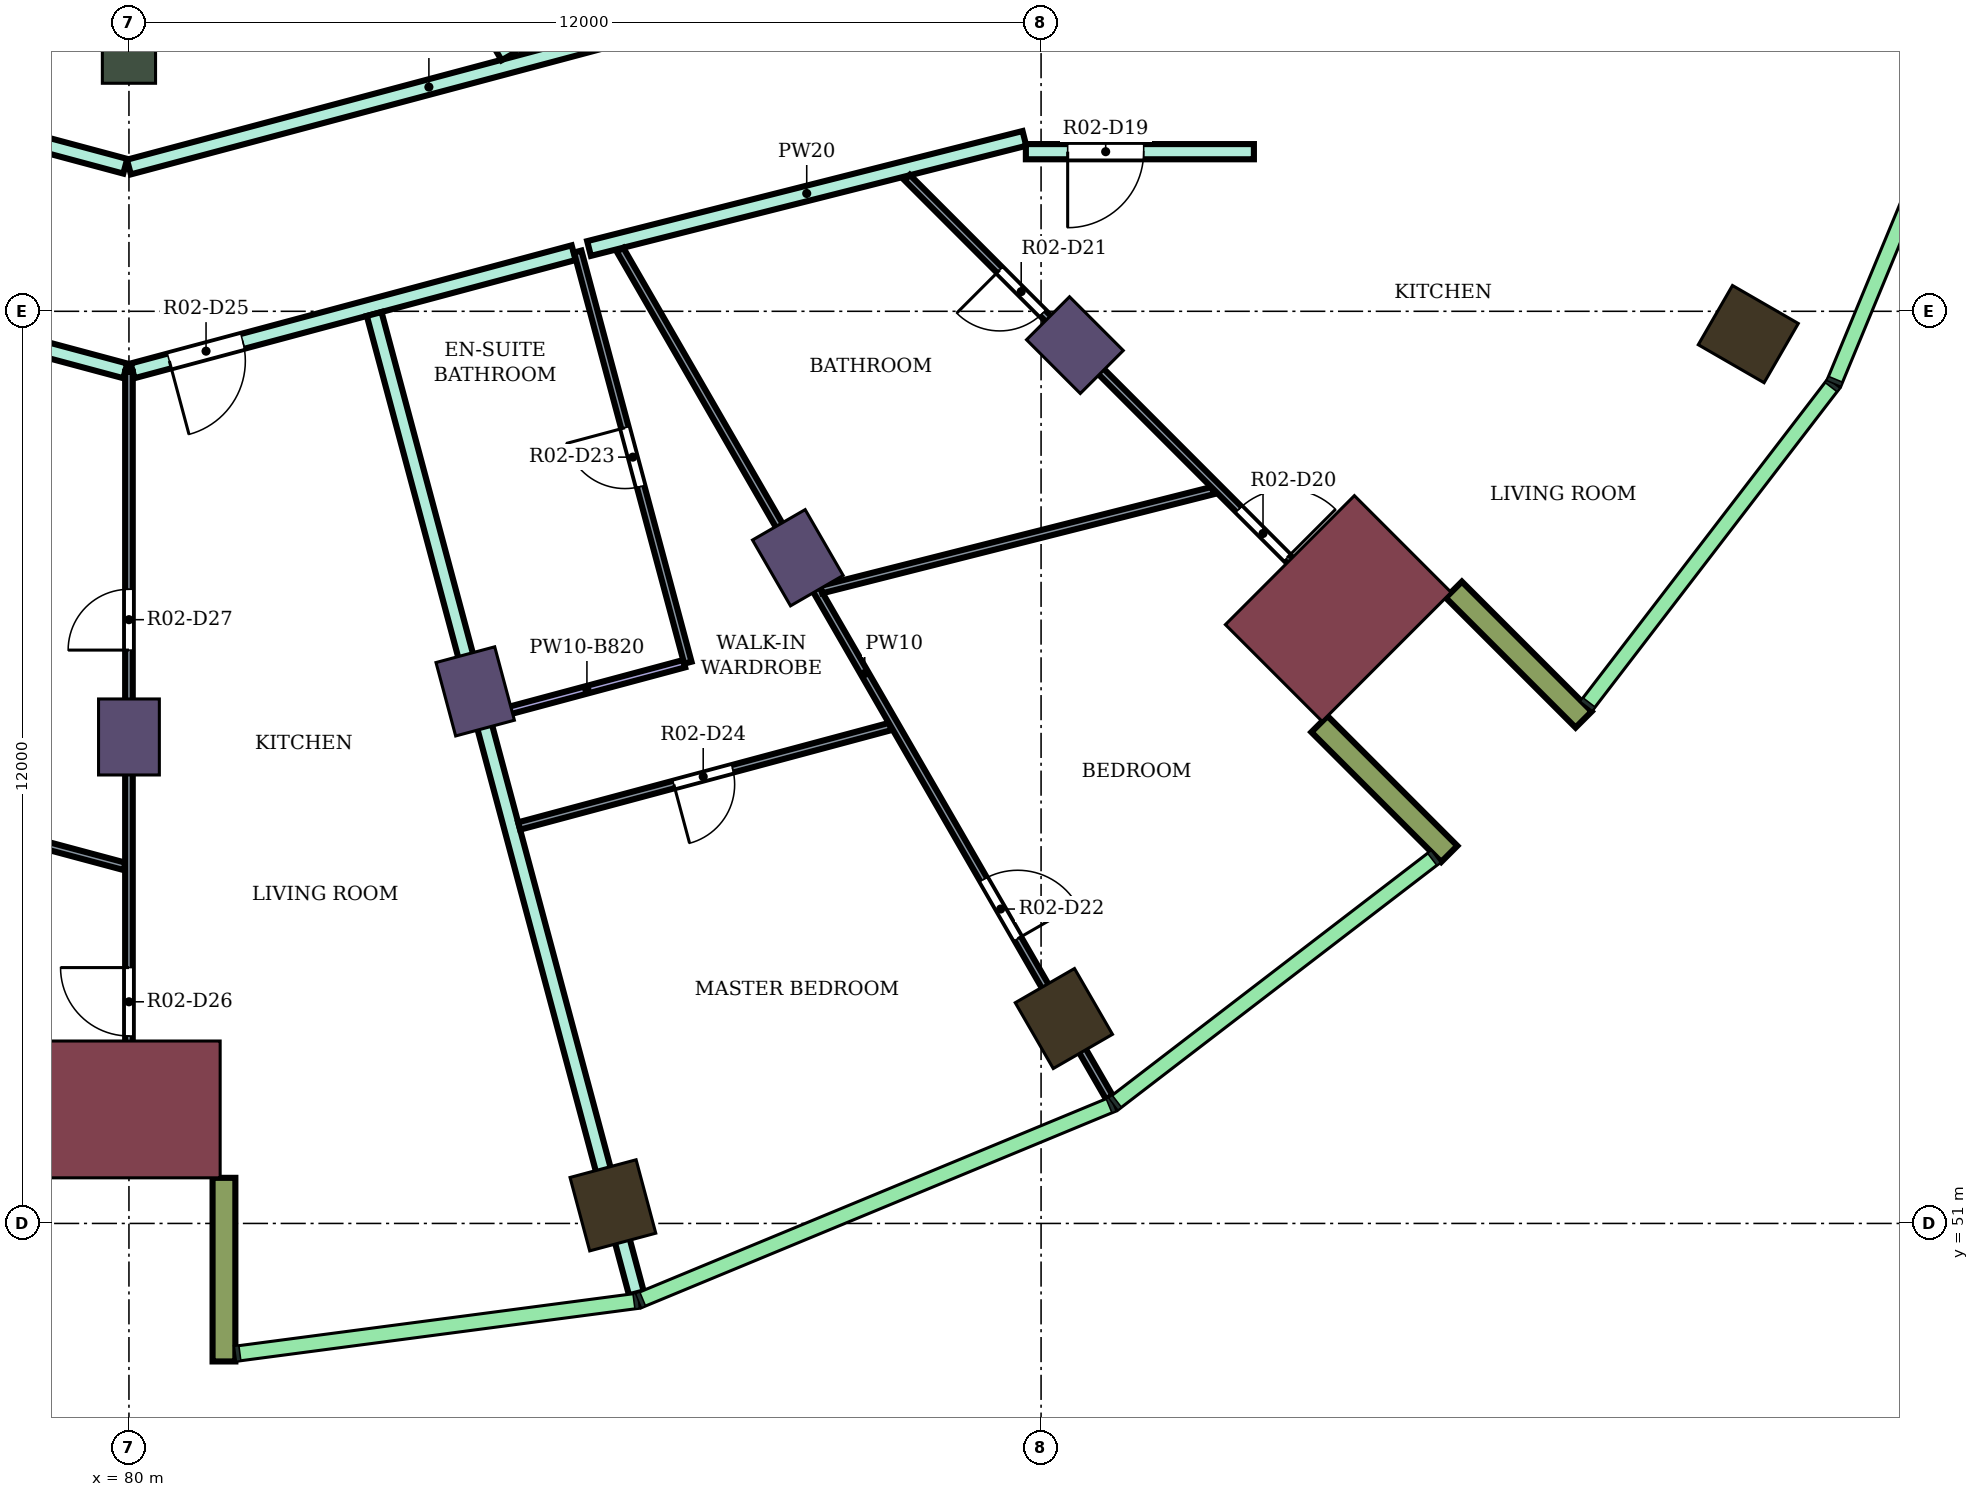
"""IFC4 building model, lengths in metres.
Left out: names, types, materials, properties, quantities, classifications, styles, units other than length and angle.
Written with IfcOpenShell. Run it as: python <this file> out.ifc"""

import sys

from ifc_helpers import new_model, si_unit, direction, frame, frame_2d, origin, origin_2d, place, context, subcontext, project, spatial, rectangle, extrude, element, fill, save


model = new_model("IFC4")
c1 = context("Model", 3, precision=1e-05, world=origin(), true_north=direction((0.0, 1.0)))
c2 = subcontext(c1, "Body", "Model", "MODEL_VIEW")
j1 = project(units=[si_unit("LENGTHUNIT", "METRE"), si_unit("PLANEANGLEUNIT", "RADIAN")], contexts=[c1])
p1 = place(None, origin())
s1 = spatial("IfcSite", under=j1, at=p1, CompositionType="ELEMENT")
p2 = place(p1, origin())
s2 = spatial("IfcBuilding", under=s1, at=p2, CompositionType="ELEMENT")
p3 = place(p2, frame((0.0, 0.0, 170.0)))
s3 = spatial("IfcBuildingStorey", under=s2, at=p3, CompositionType="ELEMENT", Elevation=170.0)
for number, where, z_axis, x_axis in (
    (1, (86.367, 51.238, 0.0), (0.0, 0.0, 1.0), (0.259, -0.966, 0.0)),
    (2, (92.3, 53.696, 0.0), (0.0, 0.0, 1.0), (0.5, -0.866, 0.0)),
    (3, (101.304, 62.7, 0.0), (0.0, 0.0, 1.0), (0.866, -0.5, 0.0)),
):
    element("IfcColumn", number, at=place(p3, frame(where, z_axis=z_axis, x_axis=x_axis)), inside=s3, PredefinedType="COLUMN", context=c2, shape_type="SweptSolid", body=[
        extrude(rectangle(XDim=1.0, YDim=0.9, at=origin_2d()), origin(), (0.0, 0.0, 1.0), 4.1),
    ])
for number, where, z_axis, x_axis in (
    (4, (80.0, 57.4, 0.0), (0.0, 0.0, 1.0), (0.0, -1.0, 0.0)),
    (5, (84.555, 58.0, 0.0), (0.0, 0.0, 1.0), (0.259, -0.966, 0.0)),
    (6, (88.8, 59.758, 0.0), (0.0, 0.0, 1.0), (0.5, -0.866, 0.0)),
    (7, (92.445, 62.555, 0.0), (0.0, 0.0, 1.0), (0.707, -0.707, 0.0)),
):
    element("IfcColumn", number, at=place(p3, frame(where, z_axis=z_axis, x_axis=x_axis)), inside=s3, PredefinedType="COLUMN", context=c2, shape_type="SweptSolid", body=[
        extrude(rectangle(XDim=1.0, YDim=0.8, at=origin_2d()), origin(), (0.0, 0.0, 1.0), 4.1),
    ])
p4 = place(p3, frame((80.0, 66.4, 0.0), z_axis=(0.0, 0.0, 1.0), x_axis=(0.0, -1.0, 0.0)))
e8 = element("IfcColumn", 8, at=p4, inside=s3, PredefinedType="COLUMN", context=c2, shape_type="SweptSolid", body=[
    extrude(rectangle(XDim=0.8, YDim=0.7, at=origin_2d()), origin(), (0.0, 0.0, 1.0), 4.1),
])
for number, where, z_axis, x_axis in (
    (9, (80.0, 52.5, 0.0), (0.0, 0.0, 1.0), (0.0, -1.0, 0.0)),
    (10, (95.91, 59.09, 0.0), (0.0, 0.0, 1.0), (0.707, -0.707, 0.0)),
):
    element("IfcColumn", number, at=place(p3, frame(where, z_axis=z_axis, x_axis=x_axis)), inside=s3, PredefinedType="COLUMN", context=c2, shape_type="SweptSolid", body=[
        extrude(rectangle(XDim=1.8, YDim=2.4, at=origin_2d()), origin(), (0.0, 0.0, 1.0), 4.1),
    ])
for number, where, z_axis, x_axis in (
    (11, (81.25, 51.6, 0.0), (0.0, 0.0, 1.0), (0.0, -1.0, 0.0)),
    (12, (95.662, 57.57, 0.0), (0.0, 0.0, 1.0), (0.707, -0.707, 0.0)),
    (13, (97.43, 59.338, 0.0), (0.0, 0.0, 1.0), (0.707, -0.707, 0.0)),
):
    element("IfcWall", number, at=place(p3, frame(where, z_axis=z_axis, x_axis=x_axis)), inside=s3, PredefinedType="NOTDEFINED", context=c2, shape_type="SweptSolid", body=[
        extrude(rectangle(XDim=2.416, YDim=0.3, at=frame_2d((1.208, 0.0))), origin(), (0.0, 0.0, 1.0), 4.1),
    ])
p5 = place(p3, frame((73.947, 63.826, 0.0), z_axis=(0.0, 0.0, 1.0), x_axis=(0.965908253407, -0.258884619088, 0.0)))
e14 = element("IfcWall", 14, at=p5, inside=s3, PredefinedType="PARTITIONING", context=c2, shape_type="SweptSolid", body=[
    extrude(rectangle(XDim=6.217, YDim=0.2, at=frame_2d((3.108, 0.0))), origin(), (0.0, 0.0, 1.0), 3.65),
])
p6 = place(p5, frame((1.424, 0.0, 0.0)))
e15 = element("IfcOpeningElement", 15, at=p6, cuts=e14, PredefinedType="OPENING", context=c2, shape_type="SweptSolid", body=[
    extrude(rectangle(XDim=1.0, YDim=2.1, at=frame_2d((0.5, 1.05))), frame((0.0, 0.11, 0.0), z_axis=(0.0, -1.0, 0.0), x_axis=(1.0, 0.0, 0.0)), (0.0, 0.0, 1.0), 0.22),
])
p7 = place(p3, frame((74.603, 66.342, 0.0), z_axis=(0.0, 0.0, 1.0), x_axis=(0.965895298152, -0.258932950796, 0.0)))
e16 = element("IfcWall", 16, at=p7, inside=s3, PredefinedType="PARTITIONING", context=c2, shape_type="SweptSolid", body=[
    extrude(rectangle(XDim=5.538, YDim=0.2, at=frame_2d((2.769, 0.0))), origin(), (0.0, 0.0, 1.0), 3.65),
])
p8 = place(p7, frame((2.062, 0.0, 0.0)))
e17 = element("IfcOpeningElement", 17, at=p8, cuts=e16, PredefinedType="OPENING", context=c2, shape_type="SweptSolid", body=[
    extrude(rectangle(XDim=1.8, YDim=2.1, at=frame_2d((0.9, 1.05))), frame((0.0, 0.11, 0.0), z_axis=(0.0, -1.0, 0.0), x_axis=(1.0, 0.0, 0.0)), (0.0, 0.0, 1.0), 0.22),
])
p9 = place(p3, frame((80.0, 64.898, 0.0), z_axis=(0.0, 0.0, 1.0), x_axis=(0.966237419782, 0.257653349704, 0.0)))
e18 = element("IfcWall", 18, at=p9, inside=s3, PredefinedType="PARTITIONING", context=c2, shape_type="SweptSolid", body=[
    extrude(rectangle(XDim=8.169, YDim=0.2, at=frame_2d((4.084, 0.0))), origin(), (0.0, 0.0, 1.0), 3.65),
])
p10 = place(p9, frame((6.428, 0.0, 0.0)))
e19 = element("IfcOpeningElement", 19, at=p10, cuts=e18, PredefinedType="OPENING", context=c2, shape_type="SweptSolid", body=[
    extrude(rectangle(XDim=0.9, YDim=2.1, at=frame_2d((0.45, 1.05))), frame((0.0, 0.11, 0.0), z_axis=(0.0, -1.0, 0.0), x_axis=(1.0, 0.0, 0.0)), (0.0, 0.0, 1.0), 0.22),
])
p11 = place(p3, frame((80.048, 62.217, 0.0), z_axis=(0.0, 0.0, 1.0), x_axis=(0.965941520544, 0.258760466242, 0.0)))
e20 = element("IfcWall", 20, at=p11, inside=s3, PredefinedType="PARTITIONING", context=c2, shape_type="SweptSolid", body=[
    extrude(rectangle(XDim=6.006, YDim=0.2, at=frame_2d((3.003, 0.0))), origin(), (0.0, 0.0, 1.0), 3.65),
])
p12 = place(p11, frame((0.5, 0.0, 0.0)))
e21 = element("IfcOpeningElement", 21, at=p12, cuts=e20, PredefinedType="OPENING", context=c2, shape_type="SweptSolid", body=[
    extrude(rectangle(XDim=1.0, YDim=2.1, at=frame_2d((0.5, 1.05))), frame((0.0, 0.11, 0.0), z_axis=(0.0, -1.0, 0.0), x_axis=(1.0, 0.0, 0.0)), (0.0, 0.0, 1.0), 0.22),
])
p13 = place(p3, frame((83.226, 62.965, 0.0), z_axis=(0.0, 0.0, 1.0), x_axis=(0.258657094602, -0.965969206244, 0.0)))
e22 = element("IfcWall", 22, at=p13, inside=s3, PredefinedType="PARTITIONING", context=c2, shape_type="SweptSolid", body=[
    extrude(rectangle(XDim=13.338, YDim=0.2, at=frame_2d((6.669, 0.0))), origin(), (0.0, 0.0, 1.0), 3.65),
])
p14 = place(p3, frame((83.847, 68.331, 0.0), z_axis=(0.0, 0.0, 1.0), x_axis=(0.499851978358, -0.866110847255, 0.0)))
e23 = element("IfcWall", 23, at=p14, inside=s3, PredefinedType="PARTITIONING", context=c2, shape_type="SweptSolid", body=[
    extrude(rectangle(XDim=2.284, YDim=0.2, at=frame_2d((1.142, 0.0))), origin(), (0.0, 0.0, 1.0), 3.65),
])
p15 = place(p3, frame((86.053, 63.826, 0.0), z_axis=(0.0, 0.0, 1.0), x_axis=(0.969490004987, 0.245130843083, 0.0)))
e24 = element("IfcWall", 24, at=p15, inside=s3, PredefinedType="PARTITIONING", context=c2, shape_type="SweptSolid", body=[
    extrude(rectangle(XDim=5.908, YDim=0.2, at=frame_2d((2.954, 0.0))), origin(), (0.0, 0.0, 1.0), 3.65),
])
p16 = place(p3, frame((91.8, 65.1, 0.0), z_axis=(0.0, 0.0, 1.0), x_axis=(1.0, 0.0, 0.0)))
e25 = element("IfcWall", 25, at=p16, inside=s3, PredefinedType="PARTITIONING", context=c2, shape_type="SweptSolid", body=[
    extrude(rectangle(XDim=3.0, YDim=0.2, at=frame_2d((1.5, 0.0))), origin(), (0.0, 0.0, 1.0), 3.65),
])
p17 = place(p16, frame((0.55, 0.0, 0.0)))
e26 = element("IfcOpeningElement", 26, at=p17, cuts=e25, PredefinedType="OPENING", context=c2, shape_type="SweptSolid", body=[
    extrude(rectangle(XDim=1.0, YDim=2.1, at=frame_2d((0.5, 1.05))), frame((0.0, 0.11, 0.0), z_axis=(0.0, -1.0, 0.0), x_axis=(1.0, 0.0, 0.0)), (0.0, 0.0, 1.0), 0.22),
])
p18 = place(p3, frame((75.267, 56.95, 0.0), z_axis=(0.0, 0.0, 1.0), x_axis=(0.965934541962, -0.258786515577, 0.0)))
e27 = element("IfcWall", 27, at=p18, inside=s3, PredefinedType="PARTITIONING", context=c2, shape_type="SweptSolid", body=[
    extrude(rectangle(XDim=4.84, YDim=0.1, at=frame_2d((2.42, 0.0))), origin(), (0.0, 0.0, 1.0), 3.65),
])
p19 = place(p3, frame((80.0, 51.8, 0.0), z_axis=(0.0, 0.0, 1.0), x_axis=(0.0, 1.0, 0.0)))
e28 = element("IfcWall", 28, at=p19, inside=s3, PredefinedType="PARTITIONING", context=c2, shape_type="SweptSolid", body=[
    extrude(rectangle(XDim=10.404, YDim=0.1, at=frame_2d((5.202, 0.0))), origin(), (0.0, 0.0, 1.0), 3.65),
])
p20 = place(p19, frame((1.666, 0.0, 0.0)))
e29 = element("IfcOpeningElement", 29, at=p20, cuts=e28, PredefinedType="OPENING", context=c2, shape_type="SweptSolid", body=[
    extrude(rectangle(XDim=0.9, YDim=2.1, at=frame_2d((0.45, 1.05))), frame((0.0, 0.06, 0.0), z_axis=(0.0, -1.0, 0.0), x_axis=(1.0, 0.0, 0.0)), (0.0, 0.0, 1.0), 0.12),
])
p21 = place(p19, frame((6.743, 0.0, 0.0)))
e30 = element("IfcOpeningElement", 30, at=p21, cuts=e28, PredefinedType="OPENING", context=c2, shape_type="SweptSolid", body=[
    extrude(rectangle(XDim=0.8, YDim=2.1, at=frame_2d((0.4, 1.05))), frame((0.0, 0.06, 0.0), z_axis=(0.0, -1.0, 0.0), x_axis=(1.0, 0.0, 0.0)), (0.0, 0.0, 1.0), 0.12),
])
p22 = place(p3, frame((84.746, 57.678, 0.0), z_axis=(0.0, 0.0, 1.0), x_axis=(0.965894568086, 0.258935674139, 0.0)))
e31 = element("IfcWall", 31, at=p22, inside=s3, PredefinedType="PARTITIONING", context=c2, shape_type="SweptSolid", body=[
    extrude(rectangle(XDim=2.649, YDim=0.1, at=frame_2d((1.325, 0.0))), origin(), (0.0, 0.0, 1.0), 3.28),
])
p23 = place(p3, frame((85.134, 56.229, 0.0), z_axis=(0.0, 0.0, 1.0), x_axis=(0.965894130068, 0.258937308051, 0.0)))
e32 = element("IfcWall", 32, at=p23, inside=s3, PredefinedType="PARTITIONING", context=c2, shape_type="SweptSolid", body=[
    extrude(rectangle(XDim=5.054, YDim=0.1, at=frame_2d((2.527, 0.0))), origin(), (0.0, 0.0, 1.0), 3.65),
])
p24 = place(p23, frame((2.107, 0.0, 0.0)))
e33 = element("IfcOpeningElement", 33, at=p24, cuts=e32, PredefinedType="OPENING", context=c2, shape_type="SweptSolid", body=[
    extrude(rectangle(XDim=0.8, YDim=2.1, at=frame_2d((0.4, 1.05))), frame((0.0, 0.06, 0.0), z_axis=(0.0, -1.0, 0.0), x_axis=(1.0, 0.0, 0.0)), (0.0, 0.0, 1.0), 0.12),
])
p25 = place(p3, frame((85.904, 63.786, 0.0), z_axis=(0.0, 0.0, 1.0), x_axis=(0.258761510459, -0.965941240814, 0.0)))
e34 = element("IfcWall", 34, at=p25, inside=s3, PredefinedType="PARTITIONING", context=c2, shape_type="SweptSolid", body=[
    extrude(rectangle(XDim=5.6, YDim=0.1, at=frame_2d((2.8, 0.0))), origin(), (0.0, 0.0, 1.0), 3.65),
])
p26 = place(p25, frame((2.4, 0.0, 0.0)))
e35 = element("IfcOpeningElement", 35, at=p26, cuts=e34, PredefinedType="OPENING", context=c2, shape_type="SweptSolid", body=[
    extrude(rectangle(XDim=0.8, YDim=2.1, at=frame_2d((0.4, 1.05))), frame((0.0, 0.06, 0.0), z_axis=(0.0, -1.0, 0.0), x_axis=(1.0, 0.0, 0.0)), (0.0, 0.0, 1.0), 0.12),
])
p27 = place(p3, frame((86.461, 63.81, 0.0), z_axis=(0.0, 0.0, 1.0), x_axis=(0.49994840431, -0.866055190521, 0.0)))
e36 = element("IfcWall", 36, at=p27, inside=s3, PredefinedType="PARTITIONING", context=c2, shape_type="SweptSolid", body=[
    extrude(rectangle(XDim=12.876, YDim=0.1, at=frame_2d((6.438, 0.0))), origin(), (0.0, 0.0, 1.0), 3.65),
])
p28 = place(p27, frame((9.565, 0.0, 0.0)))
e37 = element("IfcOpeningElement", 37, at=p28, cuts=e36, PredefinedType="OPENING", context=c2, shape_type="SweptSolid", body=[
    extrude(rectangle(XDim=0.9, YDim=2.1, at=frame_2d((0.45, 1.05))), frame((0.0, 0.06, 0.0), z_axis=(0.0, -1.0, 0.0), x_axis=(1.0, 0.0, 0.0)), (0.0, 0.0, 1.0), 0.12),
])
p29 = place(p3, frame((89.109, 59.339, 0.0), z_axis=(0.0, 0.0, 1.0), x_axis=(0.969449434389, 0.245291243552, 0.0)))
e38 = element("IfcWall", 38, at=p29, inside=s3, PredefinedType="PARTITIONING", context=c2, shape_type="SweptSolid", body=[
    extrude(rectangle(XDim=5.314, YDim=0.1, at=frame_2d((2.657, 0.0))), origin(), (0.0, 0.0, 1.0), 3.65),
])
p30 = place(p3, frame((90.238, 64.76, 0.0), z_axis=(0.0, 0.0, 1.0), x_axis=(0.707022780144, -0.707190772251, 0.0)))
e39 = element("IfcWall", 39, at=p30, inside=s3, PredefinedType="PARTITIONING", context=c2, shape_type="SweptSolid", body=[
    extrude(rectangle(XDim=8.72, YDim=0.1, at=frame_2d((4.36, 0.0))), origin(), (0.0, 0.0, 1.0), 3.65),
])
p31 = place(p30, frame((6.172, 0.0, 0.0)))
e40 = element("IfcOpeningElement", 40, at=p31, cuts=e39, PredefinedType="OPENING", context=c2, shape_type="SweptSolid", body=[
    extrude(rectangle(XDim=0.9, YDim=2.1, at=frame_2d((0.45, 1.05))), frame((0.0, 0.06, 0.0), z_axis=(0.0, -1.0, 0.0), x_axis=(1.0, 0.0, 0.0)), (0.0, 0.0, 1.0), 0.12),
])
p32 = place(p30, frame((1.722, 0.0, 0.0)))
e41 = element("IfcOpeningElement", 41, at=p32, cuts=e39, PredefinedType="OPENING", context=c2, shape_type="SweptSolid", body=[
    extrude(rectangle(XDim=0.8, YDim=2.1, at=frame_2d((0.4, 1.05))), frame((0.0, 0.06, 0.0), z_axis=(0.0, -1.0, 0.0), x_axis=(1.0, 0.0, 0.0)), (0.0, 0.0, 1.0), 0.12),
])
p33 = place(p17, frame((1.0, 0.0, 0.0), z_axis=(0.0, 0.0, 1.0), x_axis=(-1.0, 0.0, 0.0)))
e42 = element("IfcDoor", 42, at=p33, inside=s3, OperationType="SINGLE_SWING_RIGHT", PredefinedType="DOOR", context=c2, shape_type="SweptSolid", body=[
    extrude(rectangle(XDim=1.0, YDim=2.1, at=frame_2d((0.5, 1.05))), frame((0.0, 0.025, 0.0), z_axis=(0.0, -1.0, 0.0), x_axis=(1.0, 0.0, 0.0)), (0.0, 0.0, 1.0), 0.05),
])
fill(e26, e42)
p34 = place(p31, origin())
e43 = element("IfcDoor", 43, at=p34, inside=s3, OperationType="SINGLE_SWING_RIGHT", PredefinedType="DOOR", context=c2, shape_type="SweptSolid", body=[
    extrude(rectangle(XDim=0.9, YDim=2.1, at=frame_2d((0.45, 1.05))), frame((0.0, 0.025, 0.0), z_axis=(0.0, -1.0, 0.0), x_axis=(1.0, 0.0, 0.0)), (0.0, 0.0, 1.0), 0.05),
])
fill(e40, e43)
p35 = place(p32, frame((0.8, 0.0, 0.0), z_axis=(0.0, 0.0, 1.0), x_axis=(-1.0, 0.0, 0.0)))
e44 = element("IfcDoor", 44, at=p35, inside=s3, OperationType="SINGLE_SWING_RIGHT", PredefinedType="DOOR", context=c2, shape_type="SweptSolid", body=[
    extrude(rectangle(XDim=0.8, YDim=2.1, at=frame_2d((0.4, 1.05))), frame((0.0, 0.025, 0.0), z_axis=(0.0, -1.0, 0.0), x_axis=(1.0, 0.0, 0.0)), (0.0, 0.0, 1.0), 0.05),
])
fill(e41, e44)
p36 = place(p28, origin())
e45 = element("IfcDoor", 45, at=p36, inside=s3, OperationType="SINGLE_SWING_RIGHT", PredefinedType="DOOR", context=c2, shape_type="SweptSolid", body=[
    extrude(rectangle(XDim=0.9, YDim=2.1, at=frame_2d((0.45, 1.05))), frame((0.0, 0.025, 0.0), z_axis=(0.0, -1.0, 0.0), x_axis=(1.0, 0.0, 0.0)), (0.0, 0.0, 1.0), 0.05),
])
fill(e37, e45)
p37 = place(p26, frame((0.8, 0.0, 0.0), z_axis=(0.0, 0.0, 1.0), x_axis=(-1.0, 0.0, 0.0)))
e46 = element("IfcDoor", 46, at=p37, inside=s3, OperationType="SINGLE_SWING_RIGHT", PredefinedType="DOOR", context=c2, shape_type="SweptSolid", body=[
    extrude(rectangle(XDim=0.8, YDim=2.1, at=frame_2d((0.4, 1.05))), frame((0.0, 0.025, 0.0), z_axis=(0.0, -1.0, 0.0), x_axis=(1.0, 0.0, 0.0)), (0.0, 0.0, 1.0), 0.05),
])
fill(e35, e46)
p38 = place(p24, frame((0.8, 0.0, 0.0), z_axis=(0.0, 0.0, 1.0), x_axis=(-1.0, 0.0, 0.0)))
e47 = element("IfcDoor", 47, at=p38, inside=s3, OperationType="SINGLE_SWING_RIGHT", PredefinedType="DOOR", context=c2, shape_type="SweptSolid", body=[
    extrude(rectangle(XDim=0.8, YDim=2.1, at=frame_2d((0.4, 1.05))), frame((0.0, 0.025, 0.0), z_axis=(0.0, -1.0, 0.0), x_axis=(1.0, 0.0, 0.0)), (0.0, 0.0, 1.0), 0.05),
])
fill(e33, e47)
p39 = place(p12, frame((1.0, 0.0, 0.0), z_axis=(0.0, 0.0, 1.0), x_axis=(-1.0, 0.0, 0.0)))
e48 = element("IfcDoor", 48, at=p39, inside=s3, OperationType="SINGLE_SWING_RIGHT", PredefinedType="DOOR", context=c2, shape_type="SweptSolid", body=[
    extrude(rectangle(XDim=1.0, YDim=2.1, at=frame_2d((0.5, 1.05))), frame((0.0, 0.025, 0.0), z_axis=(0.0, -1.0, 0.0), x_axis=(1.0, 0.0, 0.0)), (0.0, 0.0, 1.0), 0.05),
])
fill(e21, e48)
p40 = place(p20, origin())
e49 = element("IfcDoor", 49, at=p40, inside=s3, OperationType="SINGLE_SWING_RIGHT", PredefinedType="DOOR", context=c2, shape_type="SweptSolid", body=[
    extrude(rectangle(XDim=0.9, YDim=2.1, at=frame_2d((0.45, 1.05))), frame((0.0, 0.025, 0.0), z_axis=(0.0, -1.0, 0.0), x_axis=(1.0, 0.0, 0.0)), (0.0, 0.0, 1.0), 0.05),
])
fill(e29, e49)
p41 = place(p21, origin())
e50 = element("IfcDoor", 50, at=p41, inside=s3, OperationType="SINGLE_SWING_LEFT", PredefinedType="DOOR", context=c2, shape_type="SweptSolid", body=[
    extrude(rectangle(XDim=0.8, YDim=2.1, at=frame_2d((0.4, 1.05))), frame((0.0, 0.025, 0.0), z_axis=(0.0, -1.0, 0.0), x_axis=(1.0, 0.0, 0.0)), (0.0, 0.0, 1.0), 0.05),
])
fill(e30, e50)
save(model, sys.argv[1])
